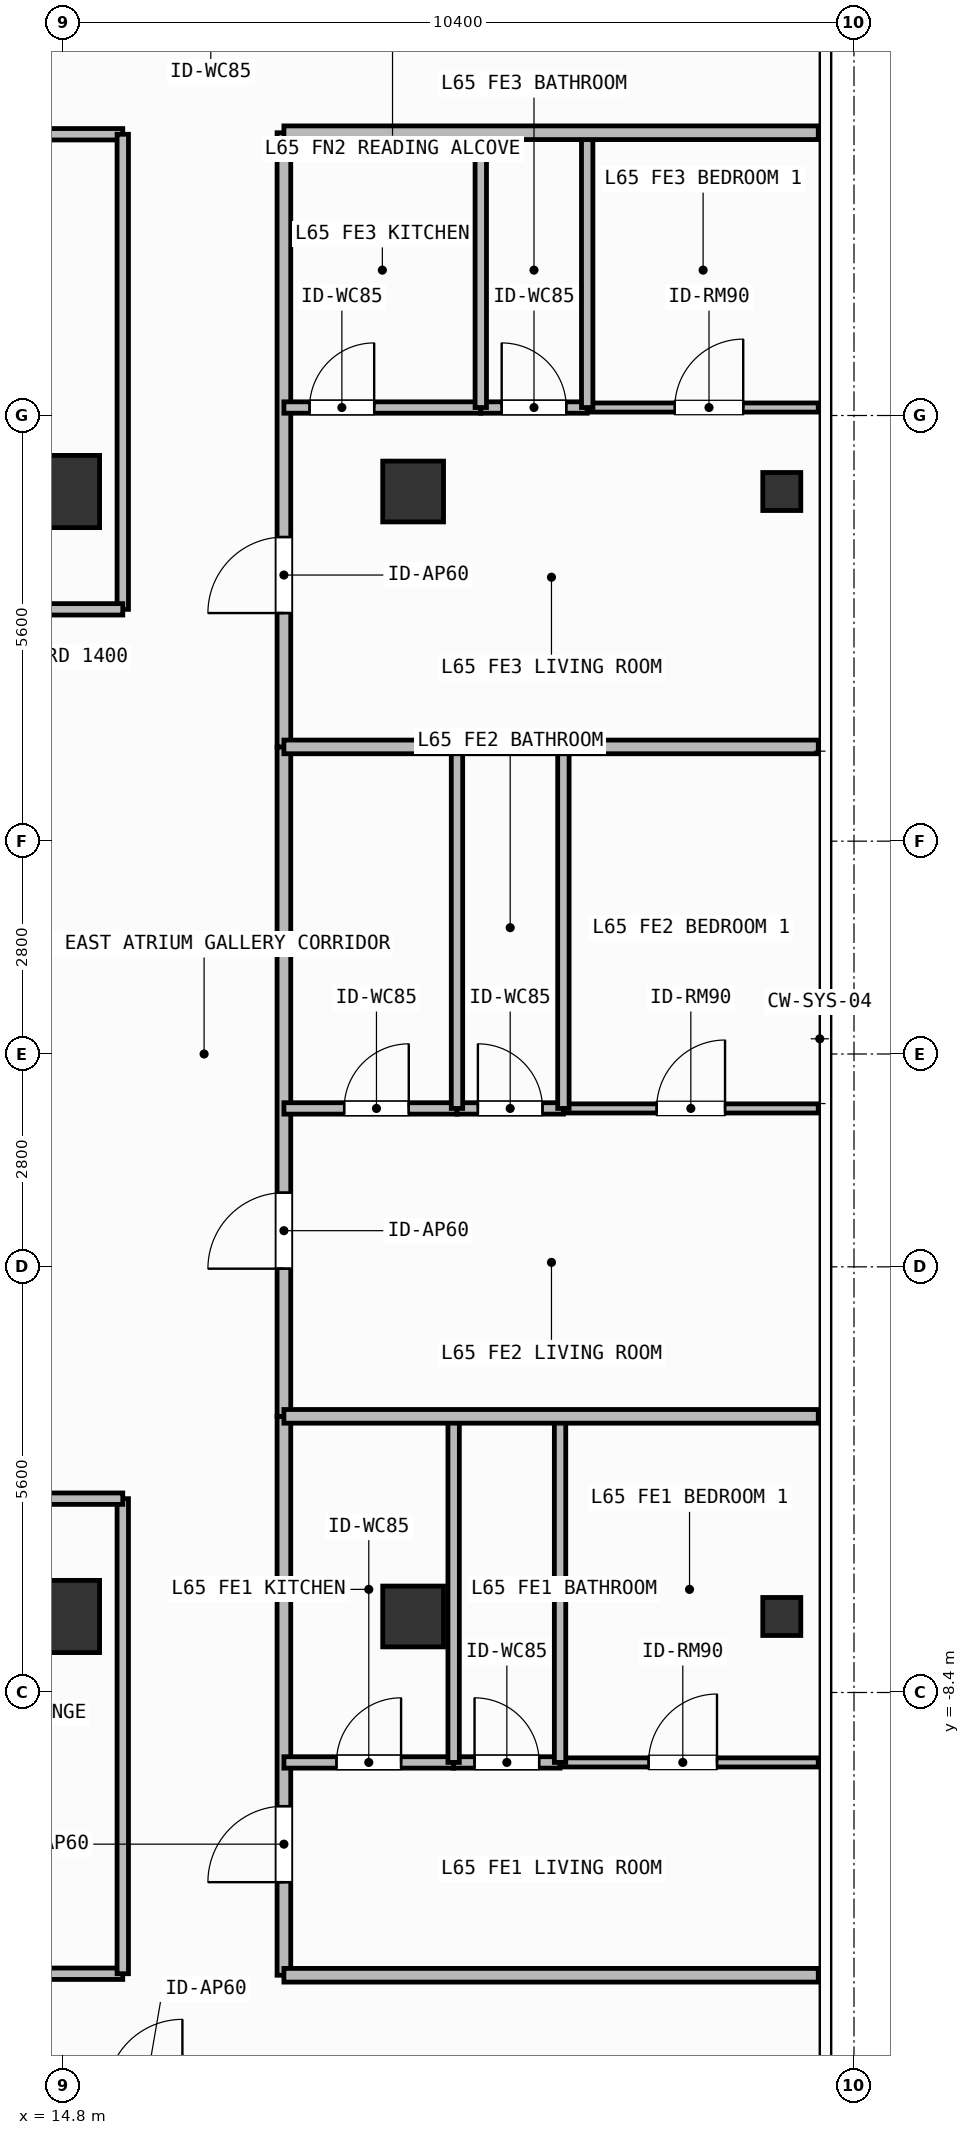
"""IFC4 building model, lengths in metres.
Left out: names, types, materials, properties, quantities, classifications, styles, units other than length and angle.
Written with IfcOpenShell. Run it as: python <this file> out.ifc"""

import sys

from ifc_helpers import new_model, si_unit, direction, frame, frame_2d, origin, origin_2d, place, context, subcontext, project, spatial, rectangle, hollow_rectangle, extrude, element, fill, save


model = new_model("IFC4")
c1 = context("Model", 3, precision=1e-05, world=origin(), true_north=direction((0.0, 1.0)))
c2 = subcontext(c1, "Body", "Model", "MODEL_VIEW")
j1 = project(units=[si_unit("LENGTHUNIT", "METRE"), si_unit("PLANEANGLEUNIT", "RADIAN")], contexts=[c1])
p1 = place(None, origin())
s1 = spatial("IfcSite", under=j1, at=p1, CompositionType="ELEMENT")
p2 = place(p1, origin())
s2 = spatial("IfcBuilding", under=s1, at=p2, CompositionType="ELEMENT")
p3 = place(p2, frame((0.0, 0.0, 266.4)))
s3 = spatial("IfcBuildingStorey", under=s2, at=p3, CompositionType="ELEMENT", Elevation=266.4)
for number, where, z_axis, x_axis in (
    (1, (14.8, -7.4, 0.0), (0.0, 0.0, 1.0), (1.0, 0.0, 0.0)),
    (2, (14.8, 7.4, 0.0), (0.0, 0.0, 1.0), (1.0, 0.0, 0.0)),
):
    element("IfcColumn", number, at=place(p3, frame(where, z_axis=z_axis, x_axis=x_axis)), inside=s3, PredefinedType="COLUMN", context=c2, shape_type="SweptSolid", body=[
        extrude(rectangle(XDim=0.95, YDim=0.95, at=origin_2d()), origin(), (0.0, 0.0, 1.0), 3.9),
    ])
for number, where, z_axis, x_axis in (
    (3, (19.4, -7.4, 0.0), (0.0, 0.0, 1.0), (1.0, 0.0, 0.0)),
    (4, (19.4, 7.4, 0.0), (0.0, 0.0, 1.0), (1.0, 0.0, 0.0)),
):
    element("IfcColumn", number, at=place(p3, frame(where, z_axis=z_axis, x_axis=x_axis)), inside=s3, PredefinedType="COLUMN", context=c2, shape_type="SweptSolid", body=[
        extrude(hollow_rectangle(XDim=0.8, YDim=0.8, WallThickness=0.036, at=origin_2d()), origin(), (0.0, 0.0, 1.0), 3.9),
    ])
for number, where, z_axis, x_axis in (
    (5, (24.25, -7.4, 0.0), (0.0, 0.0, 1.0), (1.0, 0.0, 0.0)),
    (6, (24.25, 7.4, 0.0), (0.0, 0.0, 1.0), (1.0, 0.0, 0.0)),
):
    element("IfcColumn", number, at=place(p3, frame(where, z_axis=z_axis, x_axis=x_axis)), inside=s3, PredefinedType="COLUMN", context=c2, shape_type="SweptSolid", body=[
        extrude(hollow_rectangle(XDim=0.5, YDim=0.5, WallThickness=0.025, at=origin_2d()), origin(), (0.0, 0.0, 1.0), 3.9),
    ])
p4 = place(p3, frame((10.1, -12.1, 0.0), z_axis=(0.0, 0.0, 1.0), x_axis=(1.0, 0.0, 0.0)))
e7 = element("IfcWall", 7, at=p4, inside=s3, PredefinedType="PARTITIONING", context=c2, shape_type="SweptSolid", body=[
    extrude(rectangle(XDim=5.48, YDim=0.15, at=frame_2d((2.74, 0.0))), origin(), (0.0, 0.0, 1.0), 3.68),
])
p5 = place(p4, frame((2.29, 0.0, 0.0)))
e8 = element("IfcOpeningElement", 8, at=p5, cuts=e7, PredefinedType="OPENING", context=c2, shape_type="SweptSolid", body=[
    extrude(rectangle(XDim=0.9, YDim=2.1, at=frame_2d((0.45, 1.05))), frame((0.0, 0.085, 0.0), z_axis=(0.0, -1.0, 0.0), x_axis=(1.0, 0.0, 0.0)), (0.0, 0.0, 1.0), 0.17),
])
p6 = place(p3, frame((8.36, 12.1, 0.0), z_axis=(0.0, 0.0, 1.0), x_axis=(1.0, 0.0, 0.0)))
e9 = element("IfcWall", 9, at=p6, inside=s3, PredefinedType="PARTITIONING", context=c2, shape_type="SweptSolid", body=[
    extrude(rectangle(XDim=7.22, YDim=0.15, at=frame_2d((3.61, 0.0))), origin(), (0.0, 0.0, 1.0), 3.68),
])
p7 = place(p6, frame((3.513, 0.0, 0.0)))
e10 = element("IfcOpeningElement", 10, at=p7, cuts=e9, PredefinedType="OPENING", context=c2, shape_type="SweptSolid", body=[
    extrude(rectangle(XDim=0.9, YDim=2.1, at=frame_2d((0.45, 1.05))), frame((0.0, 0.085, 0.0), z_axis=(0.0, -1.0, 0.0), x_axis=(1.0, 0.0, 0.0)), (0.0, 0.0, 1.0), 0.17),
])
p8 = place(p3, frame((17.7, -12.12, 0.0), z_axis=(0.0, 0.0, 1.0), x_axis=(0.0, 1.0, 0.0)))
e11 = element("IfcWall", 11, at=p8, inside=s3, PredefinedType="PARTITIONING", context=c2, shape_type="SweptSolid", body=[
    extrude(rectangle(XDim=7.353, YDim=0.18, at=frame_2d((3.677, 0.0))), origin(), (0.0, 0.0, 1.0), 3.68),
])
p9 = place(p8, frame((1.225, 0.0, 0.0)))
e12 = element("IfcOpeningElement", 12, at=p9, cuts=e11, PredefinedType="OPENING", context=c2, shape_type="SweptSolid", body=[
    extrude(rectangle(XDim=1.0, YDim=2.2, at=frame_2d((0.5, 1.1))), frame((0.0, 0.1, 0.0), z_axis=(0.0, -1.0, 0.0), x_axis=(1.0, 0.0, 0.0)), (0.0, 0.0, 1.0), 0.2),
])
p10 = place(p3, frame((17.7, -9.32, 0.0), z_axis=(0.0, 0.0, 1.0), x_axis=(1.0, 0.0, 0.0)))
e13 = element("IfcWall", 13, at=p10, inside=s3, PredefinedType="PARTITIONING", context=c2, shape_type="SweptSolid", body=[
    extrude(rectangle(XDim=2.233, YDim=0.15, at=frame_2d((1.117, 0.0))), origin(), (0.0, 0.0, 1.0), 3.68),
])
p11 = place(p10, frame((0.691, 0.0, 0.0)))
e14 = element("IfcOpeningElement", 14, at=p11, cuts=e13, PredefinedType="OPENING", context=c2, shape_type="SweptSolid", body=[
    extrude(rectangle(XDim=0.85, YDim=2.1, at=frame_2d((0.425, 1.05))), frame((0.0, 0.085, 0.0), z_axis=(0.0, -1.0, 0.0), x_axis=(1.0, 0.0, 0.0)), (0.0, 0.0, 1.0), 0.17),
])
p12 = place(p3, frame((19.933, -9.32, 0.0), z_axis=(0.0, 0.0, 1.0), x_axis=(1.0, 0.0, 0.0)))
e15 = element("IfcWall", 15, at=p12, inside=s3, PredefinedType="PARTITIONING", context=c2, shape_type="SweptSolid", body=[
    extrude(rectangle(XDim=1.4, YDim=0.15, at=frame_2d((0.7, 0.0))), origin(), (0.0, 0.0, 1.0), 3.68),
])
p13 = place(p12, frame((0.275, 0.0, 0.0)))
e16 = element("IfcOpeningElement", 16, at=p13, cuts=e15, PredefinedType="OPENING", context=c2, shape_type="SweptSolid", body=[
    extrude(rectangle(XDim=0.85, YDim=2.1, at=frame_2d((0.425, 1.05))), frame((0.0, 0.085, 0.0), z_axis=(0.0, -1.0, 0.0), x_axis=(1.0, 0.0, 0.0)), (0.0, 0.0, 1.0), 0.17),
])
p14 = place(p3, frame((21.333, -9.32, 0.0), z_axis=(0.0, 0.0, 1.0), x_axis=(1.0, 0.0, 0.0)))
e17 = element("IfcWall", 17, at=p14, inside=s3, PredefinedType="PARTITIONING", context=c2, shape_type="SweptSolid", body=[
    extrude(rectangle(XDim=3.397, YDim=0.12, at=frame_2d((1.698, 0.0))), origin(), (0.0, 0.0, 1.0), 3.68),
])
p15 = place(p14, frame((1.165, 0.0, 0.0)))
e18 = element("IfcOpeningElement", 18, at=p15, cuts=e17, PredefinedType="OPENING", context=c2, shape_type="SweptSolid", body=[
    extrude(rectangle(XDim=0.9, YDim=2.1, at=frame_2d((0.45, 1.05))), frame((0.0, 0.07, 0.0), z_axis=(0.0, -1.0, 0.0), x_axis=(1.0, 0.0, 0.0)), (0.0, 0.0, 1.0), 0.14),
])
p16 = place(p3, frame((17.7, -4.767, 0.0), z_axis=(0.0, 0.0, 1.0), x_axis=(0.0, 1.0, 0.0)))
e19 = element("IfcWall", 19, at=p16, inside=s3, PredefinedType="PARTITIONING", context=c2, shape_type="SweptSolid", body=[
    extrude(rectangle(XDim=8.807, YDim=0.18, at=frame_2d((4.404, 0.0))), origin(), (0.0, 0.0, 1.0), 3.68),
])
p17 = place(p16, frame((1.943, 0.0, 0.0)))
e20 = element("IfcOpeningElement", 20, at=p17, cuts=e19, PredefinedType="OPENING", context=c2, shape_type="SweptSolid", body=[
    extrude(rectangle(XDim=1.0, YDim=2.2, at=frame_2d((0.5, 1.1))), frame((0.0, 0.1, 0.0), z_axis=(0.0, -1.0, 0.0), x_axis=(1.0, 0.0, 0.0)), (0.0, 0.0, 1.0), 0.2),
])
p18 = place(p3, frame((17.7, -0.716, 0.0), z_axis=(0.0, 0.0, 1.0), x_axis=(1.0, 0.0, 0.0)))
e21 = element("IfcWall", 21, at=p18, inside=s3, PredefinedType="PARTITIONING", context=c2, shape_type="SweptSolid", body=[
    extrude(rectangle(XDim=2.277, YDim=0.15, at=frame_2d((1.139, 0.0))), origin(), (0.0, 0.0, 1.0), 3.68),
])
p19 = place(p18, frame((0.792, 0.0, 0.0)))
e22 = element("IfcOpeningElement", 22, at=p19, cuts=e21, PredefinedType="OPENING", context=c2, shape_type="SweptSolid", body=[
    extrude(rectangle(XDim=0.85, YDim=2.1, at=frame_2d((0.425, 1.05))), frame((0.0, 0.085, 0.0), z_axis=(0.0, -1.0, 0.0), x_axis=(1.0, 0.0, 0.0)), (0.0, 0.0, 1.0), 0.17),
])
p20 = place(p3, frame((19.977, -0.716, 0.0), z_axis=(0.0, 0.0, 1.0), x_axis=(1.0, 0.0, 0.0)))
e23 = element("IfcWall", 23, at=p20, inside=s3, PredefinedType="PARTITIONING", context=c2, shape_type="SweptSolid", body=[
    extrude(rectangle(XDim=1.4, YDim=0.15, at=frame_2d((0.7, 0.0))), origin(), (0.0, 0.0, 1.0), 3.68),
])
p21 = place(p20, frame((0.275, 0.0, 0.0)))
e24 = element("IfcOpeningElement", 24, at=p21, cuts=e23, PredefinedType="OPENING", context=c2, shape_type="SweptSolid", body=[
    extrude(rectangle(XDim=0.85, YDim=2.1, at=frame_2d((0.425, 1.05))), frame((0.0, 0.085, 0.0), z_axis=(0.0, -1.0, 0.0), x_axis=(1.0, 0.0, 0.0)), (0.0, 0.0, 1.0), 0.17),
])
p22 = place(p3, frame((21.377, -0.716, 0.0), z_axis=(0.0, 0.0, 1.0), x_axis=(1.0, 0.0, 0.0)))
e25 = element("IfcWall", 25, at=p22, inside=s3, PredefinedType="PARTITIONING", context=c2, shape_type="SweptSolid", body=[
    extrude(rectangle(XDim=3.353, YDim=0.12, at=frame_2d((1.677, 0.0))), origin(), (0.0, 0.0, 1.0), 3.68),
])
p23 = place(p22, frame((1.227, 0.0, 0.0)))
e26 = element("IfcOpeningElement", 26, at=p23, cuts=e25, PredefinedType="OPENING", context=c2, shape_type="SweptSolid", body=[
    extrude(rectangle(XDim=0.9, YDim=2.1, at=frame_2d((0.45, 1.05))), frame((0.0, 0.07, 0.0), z_axis=(0.0, -1.0, 0.0), x_axis=(1.0, 0.0, 0.0)), (0.0, 0.0, 1.0), 0.14),
])
p24 = place(p3, frame((17.7, 4.04, 0.0), z_axis=(0.0, 0.0, 1.0), x_axis=(0.0, 1.0, 0.0)))
e27 = element("IfcWall", 27, at=p24, inside=s3, PredefinedType="PARTITIONING", context=c2, shape_type="SweptSolid", body=[
    extrude(rectangle(XDim=8.08, YDim=0.18, at=frame_2d((4.04, 0.0))), origin(), (0.0, 0.0, 1.0), 3.68),
])
p25 = place(p24, frame((1.761, 0.0, 0.0)))
e28 = element("IfcOpeningElement", 28, at=p25, cuts=e27, PredefinedType="OPENING", context=c2, shape_type="SweptSolid", body=[
    extrude(rectangle(XDim=1.0, YDim=2.2, at=frame_2d((0.5, 1.1))), frame((0.0, 0.1, 0.0), z_axis=(0.0, -1.0, 0.0), x_axis=(1.0, 0.0, 0.0)), (0.0, 0.0, 1.0), 0.2),
])
p26 = place(p3, frame((17.7, 8.505, 0.0), z_axis=(0.0, 0.0, 1.0), x_axis=(1.0, 0.0, 0.0)))
e29 = element("IfcWall", 29, at=p26, inside=s3, PredefinedType="PARTITIONING", context=c2, shape_type="SweptSolid", body=[
    extrude(rectangle(XDim=2.59, YDim=0.15, at=frame_2d((1.295, 0.0))), origin(), (0.0, 0.0, 1.0), 3.68),
])
p27 = place(p26, frame((0.337, 0.0, 0.0)))
e30 = element("IfcOpeningElement", 30, at=p27, cuts=e29, PredefinedType="OPENING", context=c2, shape_type="SweptSolid", body=[
    extrude(rectangle(XDim=0.85, YDim=2.1, at=frame_2d((0.425, 1.05))), frame((0.0, 0.085, 0.0), z_axis=(0.0, -1.0, 0.0), x_axis=(1.0, 0.0, 0.0)), (0.0, 0.0, 1.0), 0.17),
])
p28 = place(p3, frame((20.29, 8.505, 0.0), z_axis=(0.0, 0.0, 1.0), x_axis=(1.0, 0.0, 0.0)))
e31 = element("IfcWall", 31, at=p28, inside=s3, PredefinedType="PARTITIONING", context=c2, shape_type="SweptSolid", body=[
    extrude(rectangle(XDim=1.4, YDim=0.15, at=frame_2d((0.7, 0.0))), origin(), (0.0, 0.0, 1.0), 3.68),
])
p29 = place(p28, frame((0.275, 0.0, 0.0)))
e32 = element("IfcOpeningElement", 32, at=p29, cuts=e31, PredefinedType="OPENING", context=c2, shape_type="SweptSolid", body=[
    extrude(rectangle(XDim=0.85, YDim=2.1, at=frame_2d((0.425, 1.05))), frame((0.0, 0.085, 0.0), z_axis=(0.0, -1.0, 0.0), x_axis=(1.0, 0.0, 0.0)), (0.0, 0.0, 1.0), 0.17),
])
p30 = place(p3, frame((21.69, 8.505, 0.0), z_axis=(0.0, 0.0, 1.0), x_axis=(1.0, 0.0, 0.0)))
e33 = element("IfcWall", 33, at=p30, inside=s3, PredefinedType="PARTITIONING", context=c2, shape_type="SweptSolid", body=[
    extrude(rectangle(XDim=3.04, YDim=0.12, at=frame_2d((1.52, 0.0))), origin(), (0.0, 0.0, 1.0), 3.68),
])
p31 = place(p30, frame((1.153, 0.0, 0.0)))
e34 = element("IfcOpeningElement", 34, at=p31, cuts=e33, PredefinedType="OPENING", context=c2, shape_type="SweptSolid", body=[
    extrude(rectangle(XDim=0.9, YDim=2.1, at=frame_2d((0.45, 1.05))), frame((0.0, 0.07, 0.0), z_axis=(0.0, -1.0, 0.0), x_axis=(1.0, 0.0, 0.0)), (0.0, 0.0, 1.0), 0.14),
])
p32 = place(p3, frame((15.58, -12.1, 0.0), z_axis=(0.0, 0.0, 1.0), x_axis=(0.0, 1.0, 0.0)))
e35 = element("IfcWall", 35, at=p32, inside=s3, PredefinedType="PARTITIONING", context=c2, shape_type="SweptSolid", body=[
    extrude(rectangle(XDim=6.25, YDim=0.15, at=frame_2d((3.125, 0.0))), origin(), (0.0, 0.0, 1.0), 3.68),
])
p33 = place(p3, frame((8.96, -5.85, 0.0), z_axis=(0.0, 0.0, 1.0), x_axis=(1.0, 0.0, 0.0)))
e36 = element("IfcWall", 36, at=p33, inside=s3, PredefinedType="PARTITIONING", context=c2, shape_type="SweptSolid", body=[
    extrude(rectangle(XDim=6.62, YDim=0.15, at=frame_2d((3.31, 0.0))), origin(), (0.0, 0.0, 1.0), 3.68),
])
p34 = place(p3, frame((15.58, 5.85, 0.0), z_axis=(0.0, 0.0, 1.0), x_axis=(0.0, 1.0, 0.0)))
e37 = element("IfcWall", 37, at=p34, inside=s3, PredefinedType="PARTITIONING", context=c2, shape_type="SweptSolid", body=[
    extrude(rectangle(XDim=6.25, YDim=0.15, at=frame_2d((3.125, 0.0))), origin(), (0.0, 0.0, 1.0), 3.68),
])
p35 = place(p3, frame((8.96, 5.85, 0.0), z_axis=(0.0, 0.0, 1.0), x_axis=(1.0, 0.0, 0.0)))
e38 = element("IfcWall", 38, at=p35, inside=s3, PredefinedType="PARTITIONING", context=c2, shape_type="SweptSolid", body=[
    extrude(rectangle(XDim=6.62, YDim=0.15, at=frame_2d((3.31, 0.0))), origin(), (0.0, 0.0, 1.0), 3.68),
])
for number, where, z_axis, x_axis in (
    (39, (19.933, -9.32, 0.0), (0.0, 0.0, 1.0), (0.0, 1.0, 0.0)),
    (40, (21.333, -9.32, 0.0), (0.0, 0.0, 1.0), (0.0, 1.0, 0.0)),
):
    element("IfcWall", number, at=place(p3, frame(where, z_axis=z_axis, x_axis=x_axis)), inside=s3, PredefinedType="PARTITIONING", context=c2, shape_type="SweptSolid", body=[
        extrude(rectangle(XDim=4.553, YDim=0.15, at=frame_2d((2.276, 0.0))), origin(), (0.0, 0.0, 1.0), 3.68),
    ])
for number, where, z_axis, x_axis in (
    (41, (19.977, -0.716, 0.0), (0.0, 0.0, 1.0), (0.0, 1.0, 0.0)),
    (42, (21.377, -0.716, 0.0), (0.0, 0.0, 1.0), (0.0, 1.0, 0.0)),
):
    element("IfcWall", number, at=place(p3, frame(where, z_axis=z_axis, x_axis=x_axis)), inside=s3, PredefinedType="PARTITIONING", context=c2, shape_type="SweptSolid", body=[
        extrude(rectangle(XDim=4.756, YDim=0.15, at=frame_2d((2.378, 0.0))), origin(), (0.0, 0.0, 1.0), 3.68),
    ])
p36 = place(p3, frame((17.7, -4.767, 0.0), z_axis=(0.0, 0.0, 1.0), x_axis=(1.0, 0.0, 0.0)))
e43 = element("IfcWall", 43, at=p36, inside=s3, PredefinedType="PARTITIONING", context=c2, shape_type="SweptSolid", body=[
    extrude(rectangle(XDim=7.03, YDim=0.18, at=frame_2d((3.515, 0.0))), origin(), (0.0, 0.0, 1.0), 3.68),
])
for number, where, z_axis, x_axis in (
    (44, (20.29, 8.505, 0.0), (0.0, 0.0, 1.0), (0.0, 1.0, 0.0)),
    (45, (21.69, 8.505, 0.0), (0.0, 0.0, 1.0), (0.0, 1.0, 0.0)),
):
    element("IfcWall", number, at=place(p3, frame(where, z_axis=z_axis, x_axis=x_axis)), inside=s3, PredefinedType="PARTITIONING", context=c2, shape_type="SweptSolid", body=[
        extrude(rectangle(XDim=3.615, YDim=0.15, at=frame_2d((1.808, 0.0))), origin(), (0.0, 0.0, 1.0), 3.68),
    ])
for number, where, z_axis, x_axis in (
    (46, (17.7, 4.04, 0.0), (0.0, 0.0, 1.0), (1.0, 0.0, 0.0)),
    (47, (17.7, -12.12, 0.0), (0.0, 0.0, 1.0), (1.0, 0.0, 0.0)),
    (48, (17.7, 12.12, 0.0), (0.0, 0.0, 1.0), (1.0, 0.0, 0.0)),
):
    element("IfcWall", number, at=place(p3, frame(where, z_axis=z_axis, x_axis=x_axis)), inside=s3, PredefinedType="PARTITIONING", context=c2, shape_type="SweptSolid", body=[
        extrude(rectangle(XDim=7.03, YDim=0.18, at=frame_2d((3.515, 0.0))), origin(), (0.0, 0.0, 1.0), 3.68),
    ])
p37 = place(p9, origin())
e49 = element("IfcDoor", 49, at=p37, inside=s3, OperationType="SINGLE_SWING_LEFT", PredefinedType="DOOR", context=c2, shape_type="SweptSolid", body=[
    extrude(rectangle(XDim=1.0, YDim=2.2, at=frame_2d((0.5, 1.1))), frame((0.0, 0.025, 0.0), z_axis=(0.0, -1.0, 0.0), x_axis=(1.0, 0.0, 0.0)), (0.0, 0.0, 1.0), 0.05),
])
fill(e12, e49)
p38 = place(p11, origin())
e50 = element("IfcDoor", 50, at=p38, inside=s3, OperationType="SINGLE_SWING_RIGHT", PredefinedType="DOOR", context=c2, shape_type="SweptSolid", body=[
    extrude(rectangle(XDim=0.85, YDim=2.1, at=frame_2d((0.425, 1.05))), frame((0.0, 0.025, 0.0), z_axis=(0.0, -1.0, 0.0), x_axis=(1.0, 0.0, 0.0)), (0.0, 0.0, 1.0), 0.05),
])
fill(e14, e50)
p39 = place(p13, origin())
e51 = element("IfcDoor", 51, at=p39, inside=s3, OperationType="SINGLE_SWING_LEFT", PredefinedType="DOOR", context=c2, shape_type="SweptSolid", body=[
    extrude(rectangle(XDim=0.85, YDim=2.1, at=frame_2d((0.425, 1.05))), frame((0.0, 0.025, 0.0), z_axis=(0.0, -1.0, 0.0), x_axis=(1.0, 0.0, 0.0)), (0.0, 0.0, 1.0), 0.05),
])
fill(e16, e51)
p40 = place(p15, origin())
e52 = element("IfcDoor", 52, at=p40, inside=s3, OperationType="SINGLE_SWING_RIGHT", PredefinedType="DOOR", context=c2, shape_type="SweptSolid", body=[
    extrude(rectangle(XDim=0.9, YDim=2.1, at=frame_2d((0.45, 1.05))), frame((0.0, 0.025, 0.0), z_axis=(0.0, -1.0, 0.0), x_axis=(1.0, 0.0, 0.0)), (0.0, 0.0, 1.0), 0.05),
])
fill(e18, e52)
p41 = place(p17, origin())
e53 = element("IfcDoor", 53, at=p41, inside=s3, OperationType="SINGLE_SWING_LEFT", PredefinedType="DOOR", context=c2, shape_type="SweptSolid", body=[
    extrude(rectangle(XDim=1.0, YDim=2.2, at=frame_2d((0.5, 1.1))), frame((0.0, 0.025, 0.0), z_axis=(0.0, -1.0, 0.0), x_axis=(1.0, 0.0, 0.0)), (0.0, 0.0, 1.0), 0.05),
])
fill(e20, e53)
p42 = place(p19, origin())
e54 = element("IfcDoor", 54, at=p42, inside=s3, OperationType="SINGLE_SWING_RIGHT", PredefinedType="DOOR", context=c2, shape_type="SweptSolid", body=[
    extrude(rectangle(XDim=0.85, YDim=2.1, at=frame_2d((0.425, 1.05))), frame((0.0, 0.025, 0.0), z_axis=(0.0, -1.0, 0.0), x_axis=(1.0, 0.0, 0.0)), (0.0, 0.0, 1.0), 0.05),
])
fill(e22, e54)
p43 = place(p21, origin())
e55 = element("IfcDoor", 55, at=p43, inside=s3, OperationType="SINGLE_SWING_LEFT", PredefinedType="DOOR", context=c2, shape_type="SweptSolid", body=[
    extrude(rectangle(XDim=0.85, YDim=2.1, at=frame_2d((0.425, 1.05))), frame((0.0, 0.025, 0.0), z_axis=(0.0, -1.0, 0.0), x_axis=(1.0, 0.0, 0.0)), (0.0, 0.0, 1.0), 0.05),
])
fill(e24, e55)
p44 = place(p23, origin())
e56 = element("IfcDoor", 56, at=p44, inside=s3, OperationType="SINGLE_SWING_RIGHT", PredefinedType="DOOR", context=c2, shape_type="SweptSolid", body=[
    extrude(rectangle(XDim=0.9, YDim=2.1, at=frame_2d((0.45, 1.05))), frame((0.0, 0.025, 0.0), z_axis=(0.0, -1.0, 0.0), x_axis=(1.0, 0.0, 0.0)), (0.0, 0.0, 1.0), 0.05),
])
fill(e26, e56)
p45 = place(p25, origin())
e57 = element("IfcDoor", 57, at=p45, inside=s3, OperationType="SINGLE_SWING_LEFT", PredefinedType="DOOR", context=c2, shape_type="SweptSolid", body=[
    extrude(rectangle(XDim=1.0, YDim=2.2, at=frame_2d((0.5, 1.1))), frame((0.0, 0.025, 0.0), z_axis=(0.0, -1.0, 0.0), x_axis=(1.0, 0.0, 0.0)), (0.0, 0.0, 1.0), 0.05),
])
fill(e28, e57)
p46 = place(p27, origin())
e58 = element("IfcDoor", 58, at=p46, inside=s3, OperationType="SINGLE_SWING_RIGHT", PredefinedType="DOOR", context=c2, shape_type="SweptSolid", body=[
    extrude(rectangle(XDim=0.85, YDim=2.1, at=frame_2d((0.425, 1.05))), frame((0.0, 0.025, 0.0), z_axis=(0.0, -1.0, 0.0), x_axis=(1.0, 0.0, 0.0)), (0.0, 0.0, 1.0), 0.05),
])
fill(e30, e58)
p47 = place(p29, origin())
e59 = element("IfcDoor", 59, at=p47, inside=s3, OperationType="SINGLE_SWING_LEFT", PredefinedType="DOOR", context=c2, shape_type="SweptSolid", body=[
    extrude(rectangle(XDim=0.85, YDim=2.1, at=frame_2d((0.425, 1.05))), frame((0.0, 0.025, 0.0), z_axis=(0.0, -1.0, 0.0), x_axis=(1.0, 0.0, 0.0)), (0.0, 0.0, 1.0), 0.05),
])
fill(e32, e59)
p48 = place(p31, origin())
e60 = element("IfcDoor", 60, at=p48, inside=s3, OperationType="SINGLE_SWING_RIGHT", PredefinedType="DOOR", context=c2, shape_type="SweptSolid", body=[
    extrude(rectangle(XDim=0.9, YDim=2.1, at=frame_2d((0.45, 1.05))), frame((0.0, 0.025, 0.0), z_axis=(0.0, -1.0, 0.0), x_axis=(1.0, 0.0, 0.0)), (0.0, 0.0, 1.0), 0.05),
])
fill(e34, e60)
save(model, sys.argv[1])
